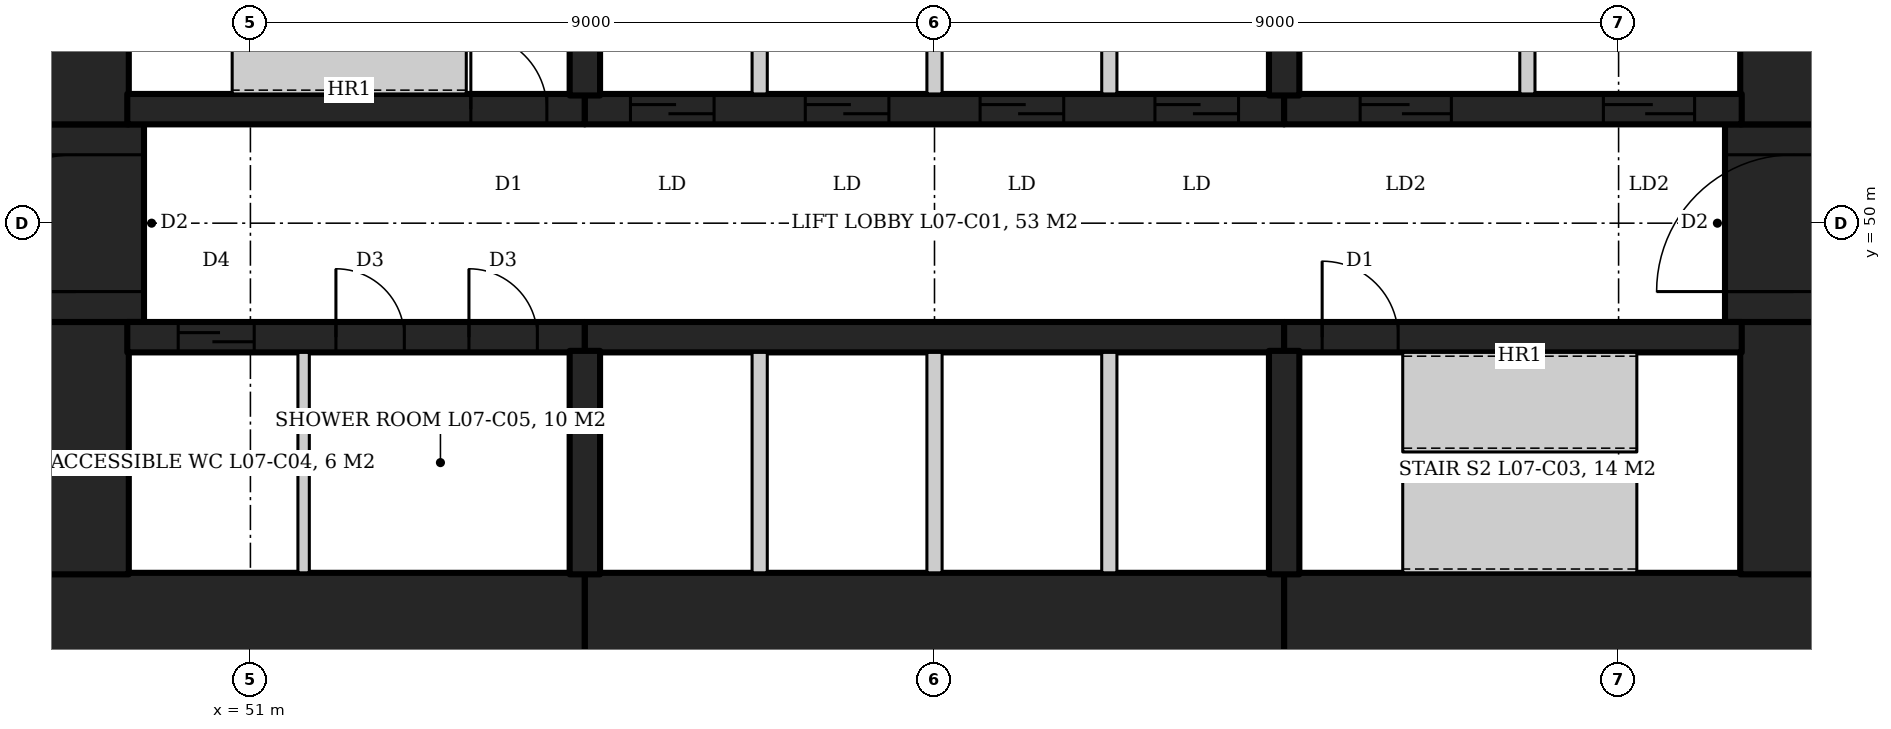
"""IFC4 building model, lengths in metres.
Left out: names, types, materials, properties, quantities, classifications, styles, units other than length and angle.
Written with IfcOpenShell. Run it as: python <this file> out.ifc"""

import sys

from ifc_helpers import new_model, si_unit, direction, frame, frame_2d, origin, place, context, subcontext, project, spatial, rectangle, extrude, element, fill, save


model = new_model("IFC4")
c1 = context("Model", 3, precision=1e-05, world=origin(), true_north=direction((0.0, 1.0)))
c2 = subcontext(c1, "Body", "Model", "MODEL_VIEW")
j1 = project(units=[si_unit("LENGTHUNIT", "METRE"), si_unit("PLANEANGLEUNIT", "RADIAN")], contexts=[c1])
p1 = place(None, origin())
s1 = spatial("IfcSite", under=j1, at=p1, CompositionType="ELEMENT")
p2 = place(p1, origin())
s2 = spatial("IfcBuilding", under=s1, at=p2, CompositionType="ELEMENT")
p3 = place(p2, frame((0.0, 0.0, 30.2)))
s3 = spatial("IfcBuildingStorey", under=s2, at=p3, CompositionType="ELEMENT", Elevation=30.2)
p4 = place(p3, frame((47.6, 44.5, 0.0), z_axis=(0.0, 0.0, 1.0), x_axis=(1.0, 0.0, 0.0)))
e1 = element("IfcWall", 1, at=p4, inside=s3, PredefinedType="SHEAR", context=c2, shape_type="SweptSolid", body=[
    extrude(rectangle(XDim=7.8, YDim=1.8, at=frame_2d((3.9, 0.0))), origin(), (0.0, 0.0, 1.0), 4.2),
])
p5 = place(p3, frame((55.4, 44.5, 0.0), z_axis=(0.0, 0.0, 1.0), x_axis=(1.0, 0.0, 0.0)))
e2 = element("IfcWall", 2, at=p5, inside=s3, PredefinedType="SHEAR", context=c2, shape_type="SweptSolid", body=[
    extrude(rectangle(XDim=9.2, YDim=1.8, at=frame_2d((4.6, 0.0))), origin(), (0.0, 0.0, 1.0), 4.2),
])
p6 = place(p3, frame((64.6, 44.5, 0.0), z_axis=(0.0, 0.0, 1.0), x_axis=(1.0, 0.0, 0.0)))
e3 = element("IfcWall", 3, at=p6, inside=s3, PredefinedType="SHEAR", context=c2, shape_type="SweptSolid", body=[
    extrude(rectangle(XDim=7.8, YDim=1.8, at=frame_2d((3.9, 0.0))), origin(), (0.0, 0.0, 1.0), 4.2),
])
p7 = place(p3, frame((71.5, 45.38, 0.0), z_axis=(0.0, 0.0, 1.0), x_axis=(0.0, 1.0, 0.0)))
e4 = element("IfcWall", 4, at=p7, inside=s3, PredefinedType="SHEAR", context=c2, shape_type="SweptSolid", body=[
    extrude(rectangle(XDim=3.32, YDim=1.8, at=frame_2d((1.66, 0.0))), origin(), (0.0, 0.0, 1.0), 4.2),
])
p8 = place(p3, frame((71.3, 48.7, 0.0), z_axis=(0.0, 0.0, 1.0), x_axis=(0.0, 1.0, 0.0)))
e5 = element("IfcWall", 5, at=p8, inside=s3, PredefinedType="SHEAR", context=c2, shape_type="SweptSolid", body=[
    extrude(rectangle(XDim=2.6, YDim=1.8, at=frame_2d((1.3, 0.0))), origin(), (0.0, 0.0, 1.0), 4.2),
])
p9 = place(p8, frame((0.4, 0.0, 0.0)))
e6 = element("IfcOpeningElement", 6, at=p9, cuts=e5, PredefinedType="OPENING", context=c2, shape_type="SweptSolid", body=[
    extrude(rectangle(XDim=1.8, YDim=2.1, at=frame_2d((0.9, 1.05))), frame((0.0, 0.91, 0.0), z_axis=(0.0, -1.0, 0.0), x_axis=(1.0, 0.0, 0.0)), (0.0, 0.0, 1.0), 1.82),
])
for number, where, z_axis, x_axis in (
    (7, (71.5, 51.3, 0.0), (0.0, 0.0, 1.0), (0.0, 1.0, 0.0)),
    (8, (48.5, 45.38, 0.0), (0.0, 0.0, 1.0), (0.0, 1.0, 0.0)),
):
    element("IfcWall", number, at=place(p3, frame(where, z_axis=z_axis, x_axis=x_axis)), inside=s3, PredefinedType="SHEAR", context=c2, shape_type="SweptSolid", body=[
        extrude(rectangle(XDim=3.32, YDim=1.8, at=frame_2d((1.66, 0.0))), origin(), (0.0, 0.0, 1.0), 4.2),
    ])
p10 = place(p3, frame((48.7, 48.7, 0.0), z_axis=(0.0, 0.0, 1.0), x_axis=(0.0, 1.0, 0.0)))
e9 = element("IfcWall", 9, at=p10, inside=s3, PredefinedType="SHEAR", context=c2, shape_type="SweptSolid", body=[
    extrude(rectangle(XDim=2.6, YDim=1.8, at=frame_2d((1.3, 0.0))), origin(), (0.0, 0.0, 1.0), 4.2),
])
p11 = place(p10, frame((0.4, 0.0, 0.0)))
e10 = element("IfcOpeningElement", 10, at=p11, cuts=e9, PredefinedType="OPENING", context=c2, shape_type="SweptSolid", body=[
    extrude(rectangle(XDim=1.8, YDim=2.1, at=frame_2d((0.9, 1.05))), frame((0.0, 0.91, 0.0), z_axis=(0.0, -1.0, 0.0), x_axis=(1.0, 0.0, 0.0)), (0.0, 0.0, 1.0), 1.82),
])
p12 = place(p3, frame((48.5, 51.3, 0.0), z_axis=(0.0, 0.0, 1.0), x_axis=(0.0, 1.0, 0.0)))
e11 = element("IfcWall", 11, at=p12, inside=s3, PredefinedType="SHEAR", context=c2, shape_type="SweptSolid", body=[
    extrude(rectangle(XDim=3.32, YDim=1.8, at=frame_2d((1.66, 0.0))), origin(), (0.0, 0.0, 1.0), 4.2),
])
p13 = place(p3, frame((49.38, 51.5, 0.0), z_axis=(0.0, 0.0, 1.0), x_axis=(1.0, 0.0, 0.0)))
e12 = element("IfcWall", 12, at=p13, inside=s3, PredefinedType="SHEAR", context=c2, shape_type="SweptSolid", body=[
    extrude(rectangle(XDim=6.02, YDim=0.4, at=frame_2d((3.01, 0.0))), origin(), (0.0, 0.0, 1.0), 4.2),
])
p14 = place(p13, frame((4.52, 0.0, 0.0)))
e13 = element("IfcOpeningElement", 13, at=p14, cuts=e12, PredefinedType="OPENING", context=c2, shape_type="SweptSolid", body=[
    extrude(rectangle(XDim=1.0, YDim=2.1, at=frame_2d((0.5, 1.05))), frame((0.0, 0.21, 0.0), z_axis=(0.0, -1.0, 0.0), x_axis=(1.0, 0.0, 0.0)), (0.0, 0.0, 1.0), 0.42),
])
p15 = place(p3, frame((55.4, 51.5, 0.0), z_axis=(0.0, 0.0, 1.0), x_axis=(1.0, 0.0, 0.0)))
e14 = element("IfcWall", 14, at=p15, inside=s3, PredefinedType="SHEAR", context=c2, shape_type="SweptSolid", body=[
    extrude(rectangle(XDim=9.2, YDim=0.4, at=frame_2d((4.6, 0.0))), origin(), (0.0, 0.0, 1.0), 4.2),
])
p16 = place(p15, frame((0.6, 0.0, 0.0)))
e15 = element("IfcOpeningElement", 15, at=p16, cuts=e14, PredefinedType="OPENING", context=c2, shape_type="SweptSolid", body=[
    extrude(rectangle(XDim=1.1, YDim=2.1, at=frame_2d((0.55, 1.05))), frame((0.0, 0.21, 0.0), z_axis=(0.0, -1.0, 0.0), x_axis=(1.0, 0.0, 0.0)), (0.0, 0.0, 1.0), 0.42),
])
p17 = place(p15, frame((2.9, 0.0, 0.0)))
e16 = element("IfcOpeningElement", 16, at=p17, cuts=e14, PredefinedType="OPENING", context=c2, shape_type="SweptSolid", body=[
    extrude(rectangle(XDim=1.1, YDim=2.1, at=frame_2d((0.55, 1.05))), frame((0.0, 0.21, 0.0), z_axis=(0.0, -1.0, 0.0), x_axis=(1.0, 0.0, 0.0)), (0.0, 0.0, 1.0), 0.42),
])
p18 = place(p15, frame((5.2, 0.0, 0.0)))
e17 = element("IfcOpeningElement", 17, at=p18, cuts=e14, PredefinedType="OPENING", context=c2, shape_type="SweptSolid", body=[
    extrude(rectangle(XDim=1.1, YDim=2.1, at=frame_2d((0.55, 1.05))), frame((0.0, 0.21, 0.0), z_axis=(0.0, -1.0, 0.0), x_axis=(1.0, 0.0, 0.0)), (0.0, 0.0, 1.0), 0.42),
])
p19 = place(p15, frame((7.5, 0.0, 0.0)))
e18 = element("IfcOpeningElement", 18, at=p19, cuts=e14, PredefinedType="OPENING", context=c2, shape_type="SweptSolid", body=[
    extrude(rectangle(XDim=1.1, YDim=2.1, at=frame_2d((0.55, 1.05))), frame((0.0, 0.21, 0.0), z_axis=(0.0, -1.0, 0.0), x_axis=(1.0, 0.0, 0.0)), (0.0, 0.0, 1.0), 0.42),
])
p20 = place(p3, frame((64.6, 51.5, 0.0), z_axis=(0.0, 0.0, 1.0), x_axis=(1.0, 0.0, 0.0)))
e19 = element("IfcWall", 19, at=p20, inside=s3, PredefinedType="SHEAR", context=c2, shape_type="SweptSolid", body=[
    extrude(rectangle(XDim=6.02, YDim=0.4, at=frame_2d((3.01, 0.0))), origin(), (0.0, 0.0, 1.0), 4.2),
])
p21 = place(p20, frame((1.0, 0.0, 0.0)))
e20 = element("IfcOpeningElement", 20, at=p21, cuts=e19, PredefinedType="OPENING", context=c2, shape_type="SweptSolid", body=[
    extrude(rectangle(XDim=1.2, YDim=2.1, at=frame_2d((0.6, 1.05))), frame((0.0, 0.21, 0.0), z_axis=(0.0, -1.0, 0.0), x_axis=(1.0, 0.0, 0.0)), (0.0, 0.0, 1.0), 0.42),
])
p22 = place(p20, frame((4.2, 0.0, 0.0)))
e21 = element("IfcOpeningElement", 21, at=p22, cuts=e19, PredefinedType="OPENING", context=c2, shape_type="SweptSolid", body=[
    extrude(rectangle(XDim=1.2, YDim=2.1, at=frame_2d((0.6, 1.05))), frame((0.0, 0.21, 0.0), z_axis=(0.0, -1.0, 0.0), x_axis=(1.0, 0.0, 0.0)), (0.0, 0.0, 1.0), 0.42),
])
p23 = place(p3, frame((49.38, 48.5, 0.0), z_axis=(0.0, 0.0, 1.0), x_axis=(1.0, 0.0, 0.0)))
e22 = element("IfcWall", 22, at=p23, inside=s3, PredefinedType="SHEAR", context=c2, shape_type="SweptSolid", body=[
    extrude(rectangle(XDim=6.02, YDim=0.4, at=frame_2d((3.01, 0.0))), origin(), (0.0, 0.0, 1.0), 4.2),
])
p24 = place(p23, frame((0.67, 0.0, 0.0)))
e23 = element("IfcOpeningElement", 23, at=p24, cuts=e22, PredefinedType="OPENING", context=c2, shape_type="SweptSolid", body=[
    extrude(rectangle(XDim=1.0, YDim=2.1, at=frame_2d((0.5, 1.05))), frame((0.0, 0.21, 0.0), z_axis=(0.0, -1.0, 0.0), x_axis=(1.0, 0.0, 0.0)), (0.0, 0.0, 1.0), 0.42),
])
p25 = place(p23, frame((2.745, 0.0, 0.0)))
e24 = element("IfcOpeningElement", 24, at=p25, cuts=e22, PredefinedType="OPENING", context=c2, shape_type="SweptSolid", body=[
    extrude(rectangle(XDim=0.9, YDim=2.1, at=frame_2d((0.45, 1.05))), frame((0.0, 0.21, 0.0), z_axis=(0.0, -1.0, 0.0), x_axis=(1.0, 0.0, 0.0)), (0.0, 0.0, 1.0), 0.42),
])
p26 = place(p23, frame((4.495, 0.0, 0.0)))
e25 = element("IfcOpeningElement", 25, at=p26, cuts=e22, PredefinedType="OPENING", context=c2, shape_type="SweptSolid", body=[
    extrude(rectangle(XDim=0.9, YDim=2.1, at=frame_2d((0.45, 1.05))), frame((0.0, 0.21, 0.0), z_axis=(0.0, -1.0, 0.0), x_axis=(1.0, 0.0, 0.0)), (0.0, 0.0, 1.0), 0.42),
])
p27 = place(p3, frame((55.4, 48.5, 0.0), z_axis=(0.0, 0.0, 1.0), x_axis=(1.0, 0.0, 0.0)))
e26 = element("IfcWall", 26, at=p27, inside=s3, PredefinedType="SHEAR", context=c2, shape_type="SweptSolid", body=[
    extrude(rectangle(XDim=9.2, YDim=0.4, at=frame_2d((4.6, 0.0))), origin(), (0.0, 0.0, 1.0), 4.2),
])
p28 = place(p3, frame((64.6, 48.5, 0.0), z_axis=(0.0, 0.0, 1.0), x_axis=(1.0, 0.0, 0.0)))
e27 = element("IfcWall", 27, at=p28, inside=s3, PredefinedType="SHEAR", context=c2, shape_type="SweptSolid", body=[
    extrude(rectangle(XDim=6.02, YDim=0.4, at=frame_2d((3.01, 0.0))), origin(), (0.0, 0.0, 1.0), 4.2),
])
p29 = place(p28, frame((0.5, 0.0, 0.0)))
e28 = element("IfcOpeningElement", 28, at=p29, cuts=e27, PredefinedType="OPENING", context=c2, shape_type="SweptSolid", body=[
    extrude(rectangle(XDim=1.0, YDim=2.1, at=frame_2d((0.5, 1.05))), frame((0.0, 0.21, 0.0), z_axis=(0.0, -1.0, 0.0), x_axis=(1.0, 0.0, 0.0)), (0.0, 0.0, 1.0), 0.42),
])
for number, where, z_axis, x_axis in (
    (29, (55.4, 51.68, 0.0), (0.0, 0.0, 1.0), (0.0, 1.0, 0.0)),
    (30, (64.6, 51.68, 0.0), (0.0, 0.0, 1.0), (0.0, 1.0, 0.0)),
    (31, (55.4, 48.32, 0.0), (0.0, 0.0, 1.0), (0.0, -1.0, 0.0)),
    (32, (64.6, 48.32, 0.0), (0.0, 0.0, 1.0), (0.0, -1.0, 0.0)),
):
    element("IfcWall", number, at=place(p3, frame(where, z_axis=z_axis, x_axis=x_axis)), inside=s3, PredefinedType="SHEAR", context=c2, shape_type="SweptSolid", body=[
        extrude(rectangle(XDim=2.94, YDim=0.4, at=frame_2d((1.47, 0.0))), origin(), (0.0, 0.0, 1.0), 4.2),
    ])
for number, where, z_axis, x_axis in (
    (33, (57.7, 51.7, 0.0), (0.0, 0.0, 1.0), (0.0, 1.0, 0.0)),
    (34, (60.0, 51.7, 0.0), (0.0, 0.0, 1.0), (0.0, 1.0, 0.0)),
    (35, (62.3, 51.7, 0.0), (0.0, 0.0, 1.0), (0.0, 1.0, 0.0)),
    (36, (57.7, 45.4, 0.0), (0.0, 0.0, 1.0), (0.0, 1.0, 0.0)),
    (37, (60.0, 45.4, 0.0), (0.0, 0.0, 1.0), (0.0, 1.0, 0.0)),
    (38, (62.3, 45.4, 0.0), (0.0, 0.0, 1.0), (0.0, 1.0, 0.0)),
    (39, (67.8, 51.7, 0.0), (0.0, 0.0, 1.0), (0.0, 1.0, 0.0)),
):
    element("IfcWall", number, at=place(p3, frame(where, z_axis=z_axis, x_axis=x_axis)), inside=s3, PredefinedType="PARTITIONING", context=c2, shape_type="SweptSolid", body=[
        extrude(rectangle(XDim=2.9, YDim=0.2, at=frame_2d((1.45, 0.0))), origin(), (0.0, 0.0, 1.0), 4.2),
    ])
p30 = place(p3, frame((51.7, 45.4, 0.0), z_axis=(0.0, 0.0, 1.0), x_axis=(0.0, 1.0, 0.0)))
e40 = element("IfcWall", 40, at=p30, inside=s3, PredefinedType="PARTITIONING", context=c2, shape_type="SweptSolid", body=[
    extrude(rectangle(XDim=2.9, YDim=0.15, at=frame_2d((1.45, 0.0))), origin(), (0.0, 0.0, 1.0), 4.04),
])
p31 = place(p14, origin())
e41 = element("IfcDoor", 41, at=p31, inside=s3, OperationType="SINGLE_SWING_LEFT", PredefinedType="DOOR", context=c2, shape_type="SweptSolid", body=[
    extrude(rectangle(XDim=1.0, YDim=2.1, at=frame_2d((0.5, 1.05))), frame((0.0, 0.025, 0.0), z_axis=(0.0, -1.0, 0.0), x_axis=(1.0, 0.0, 0.0)), (0.0, 0.0, 1.0), 0.05),
])
fill(e13, e41)
p32 = place(p29, origin())
e42 = element("IfcDoor", 42, at=p32, inside=s3, OperationType="SINGLE_SWING_LEFT", PredefinedType="DOOR", context=c2, shape_type="SweptSolid", body=[
    extrude(rectangle(XDim=1.0, YDim=2.1, at=frame_2d((0.5, 1.05))), frame((0.0, 0.025, 0.0), z_axis=(0.0, -1.0, 0.0), x_axis=(1.0, 0.0, 0.0)), (0.0, 0.0, 1.0), 0.05),
])
fill(e28, e42)
p33 = place(p21, origin())
e43 = element("IfcDoor", 43, at=p33, inside=s3, OperationType="SLIDING_TO_LEFT", PredefinedType="DOOR", context=c2, shape_type="SweptSolid", body=[
    extrude(rectangle(XDim=1.2, YDim=2.1, at=frame_2d((0.6, 1.05))), frame((0.0, 0.025, 0.0), z_axis=(0.0, -1.0, 0.0), x_axis=(1.0, 0.0, 0.0)), (0.0, 0.0, 1.0), 0.05),
])
fill(e20, e43)
p34 = place(p22, origin())
e44 = element("IfcDoor", 44, at=p34, inside=s3, OperationType="SLIDING_TO_LEFT", PredefinedType="DOOR", context=c2, shape_type="SweptSolid", body=[
    extrude(rectangle(XDim=1.2, YDim=2.1, at=frame_2d((0.6, 1.05))), frame((0.0, 0.025, 0.0), z_axis=(0.0, -1.0, 0.0), x_axis=(1.0, 0.0, 0.0)), (0.0, 0.0, 1.0), 0.05),
])
fill(e21, e44)
p35 = place(p16, origin())
e45 = element("IfcDoor", 45, at=p35, inside=s3, OperationType="SLIDING_TO_LEFT", PredefinedType="DOOR", context=c2, shape_type="SweptSolid", body=[
    extrude(rectangle(XDim=1.1, YDim=2.1, at=frame_2d((0.55, 1.05))), frame((0.0, 0.025, 0.0), z_axis=(0.0, -1.0, 0.0), x_axis=(1.0, 0.0, 0.0)), (0.0, 0.0, 1.0), 0.05),
])
fill(e15, e45)
p36 = place(p17, origin())
e46 = element("IfcDoor", 46, at=p36, inside=s3, OperationType="SLIDING_TO_LEFT", PredefinedType="DOOR", context=c2, shape_type="SweptSolid", body=[
    extrude(rectangle(XDim=1.1, YDim=2.1, at=frame_2d((0.55, 1.05))), frame((0.0, 0.025, 0.0), z_axis=(0.0, -1.0, 0.0), x_axis=(1.0, 0.0, 0.0)), (0.0, 0.0, 1.0), 0.05),
])
fill(e16, e46)
p37 = place(p18, origin())
e47 = element("IfcDoor", 47, at=p37, inside=s3, OperationType="SLIDING_TO_LEFT", PredefinedType="DOOR", context=c2, shape_type="SweptSolid", body=[
    extrude(rectangle(XDim=1.1, YDim=2.1, at=frame_2d((0.55, 1.05))), frame((0.0, 0.025, 0.0), z_axis=(0.0, -1.0, 0.0), x_axis=(1.0, 0.0, 0.0)), (0.0, 0.0, 1.0), 0.05),
])
fill(e17, e47)
p38 = place(p19, origin())
e48 = element("IfcDoor", 48, at=p38, inside=s3, OperationType="SLIDING_TO_LEFT", PredefinedType="DOOR", context=c2, shape_type="SweptSolid", body=[
    extrude(rectangle(XDim=1.1, YDim=2.1, at=frame_2d((0.55, 1.05))), frame((0.0, 0.025, 0.0), z_axis=(0.0, -1.0, 0.0), x_axis=(1.0, 0.0, 0.0)), (0.0, 0.0, 1.0), 0.05),
])
fill(e18, e48)
p39 = place(p24, origin())
e49 = element("IfcDoor", 49, at=p39, inside=s3, OperationType="SLIDING_TO_LEFT", PredefinedType="DOOR", context=c2, shape_type="SweptSolid", body=[
    extrude(rectangle(XDim=1.0, YDim=2.1, at=frame_2d((0.5, 1.05))), frame((0.0, 0.025, 0.0), z_axis=(0.0, -1.0, 0.0), x_axis=(1.0, 0.0, 0.0)), (0.0, 0.0, 1.0), 0.05),
])
fill(e23, e49)
p40 = place(p25, origin())
e50 = element("IfcDoor", 50, at=p40, inside=s3, OperationType="SINGLE_SWING_RIGHT", PredefinedType="DOOR", context=c2, shape_type="SweptSolid", body=[
    extrude(rectangle(XDim=0.9, YDim=2.1, at=frame_2d((0.45, 1.05))), frame((0.0, 0.025, 0.0), z_axis=(0.0, -1.0, 0.0), x_axis=(1.0, 0.0, 0.0)), (0.0, 0.0, 1.0), 0.05),
])
fill(e24, e50)
p41 = place(p26, origin())
e51 = element("IfcDoor", 51, at=p41, inside=s3, OperationType="SINGLE_SWING_RIGHT", PredefinedType="DOOR", context=c2, shape_type="SweptSolid", body=[
    extrude(rectangle(XDim=0.9, YDim=2.1, at=frame_2d((0.45, 1.05))), frame((0.0, 0.025, 0.0), z_axis=(0.0, -1.0, 0.0), x_axis=(1.0, 0.0, 0.0)), (0.0, 0.0, 1.0), 0.05),
])
fill(e25, e51)
p42 = place(p9, origin())
e52 = element("IfcDoor", 52, at=p42, inside=s3, OperationType="DOUBLE_DOOR_DOUBLE_SWING", PredefinedType="DOOR", context=c2, shape_type="SweptSolid", body=[
    extrude(rectangle(XDim=1.8, YDim=2.1, at=frame_2d((0.9, 1.05))), frame((0.0, 0.025, 0.0), z_axis=(0.0, -1.0, 0.0), x_axis=(1.0, 0.0, 0.0)), (0.0, 0.0, 1.0), 0.05),
])
fill(e6, e52)
p43 = place(p11, origin())
e53 = element("IfcDoor", 53, at=p43, inside=s3, OperationType="DOUBLE_DOOR_DOUBLE_SWING", PredefinedType="DOOR", context=c2, shape_type="SweptSolid", body=[
    extrude(rectangle(XDim=1.8, YDim=2.1, at=frame_2d((0.9, 1.05))), frame((0.0, 0.025, 0.0), z_axis=(0.0, -1.0, 0.0), x_axis=(1.0, 0.0, 0.0)), (0.0, 0.0, 1.0), 0.05),
])
fill(e10, e53)
save(model, sys.argv[1])
